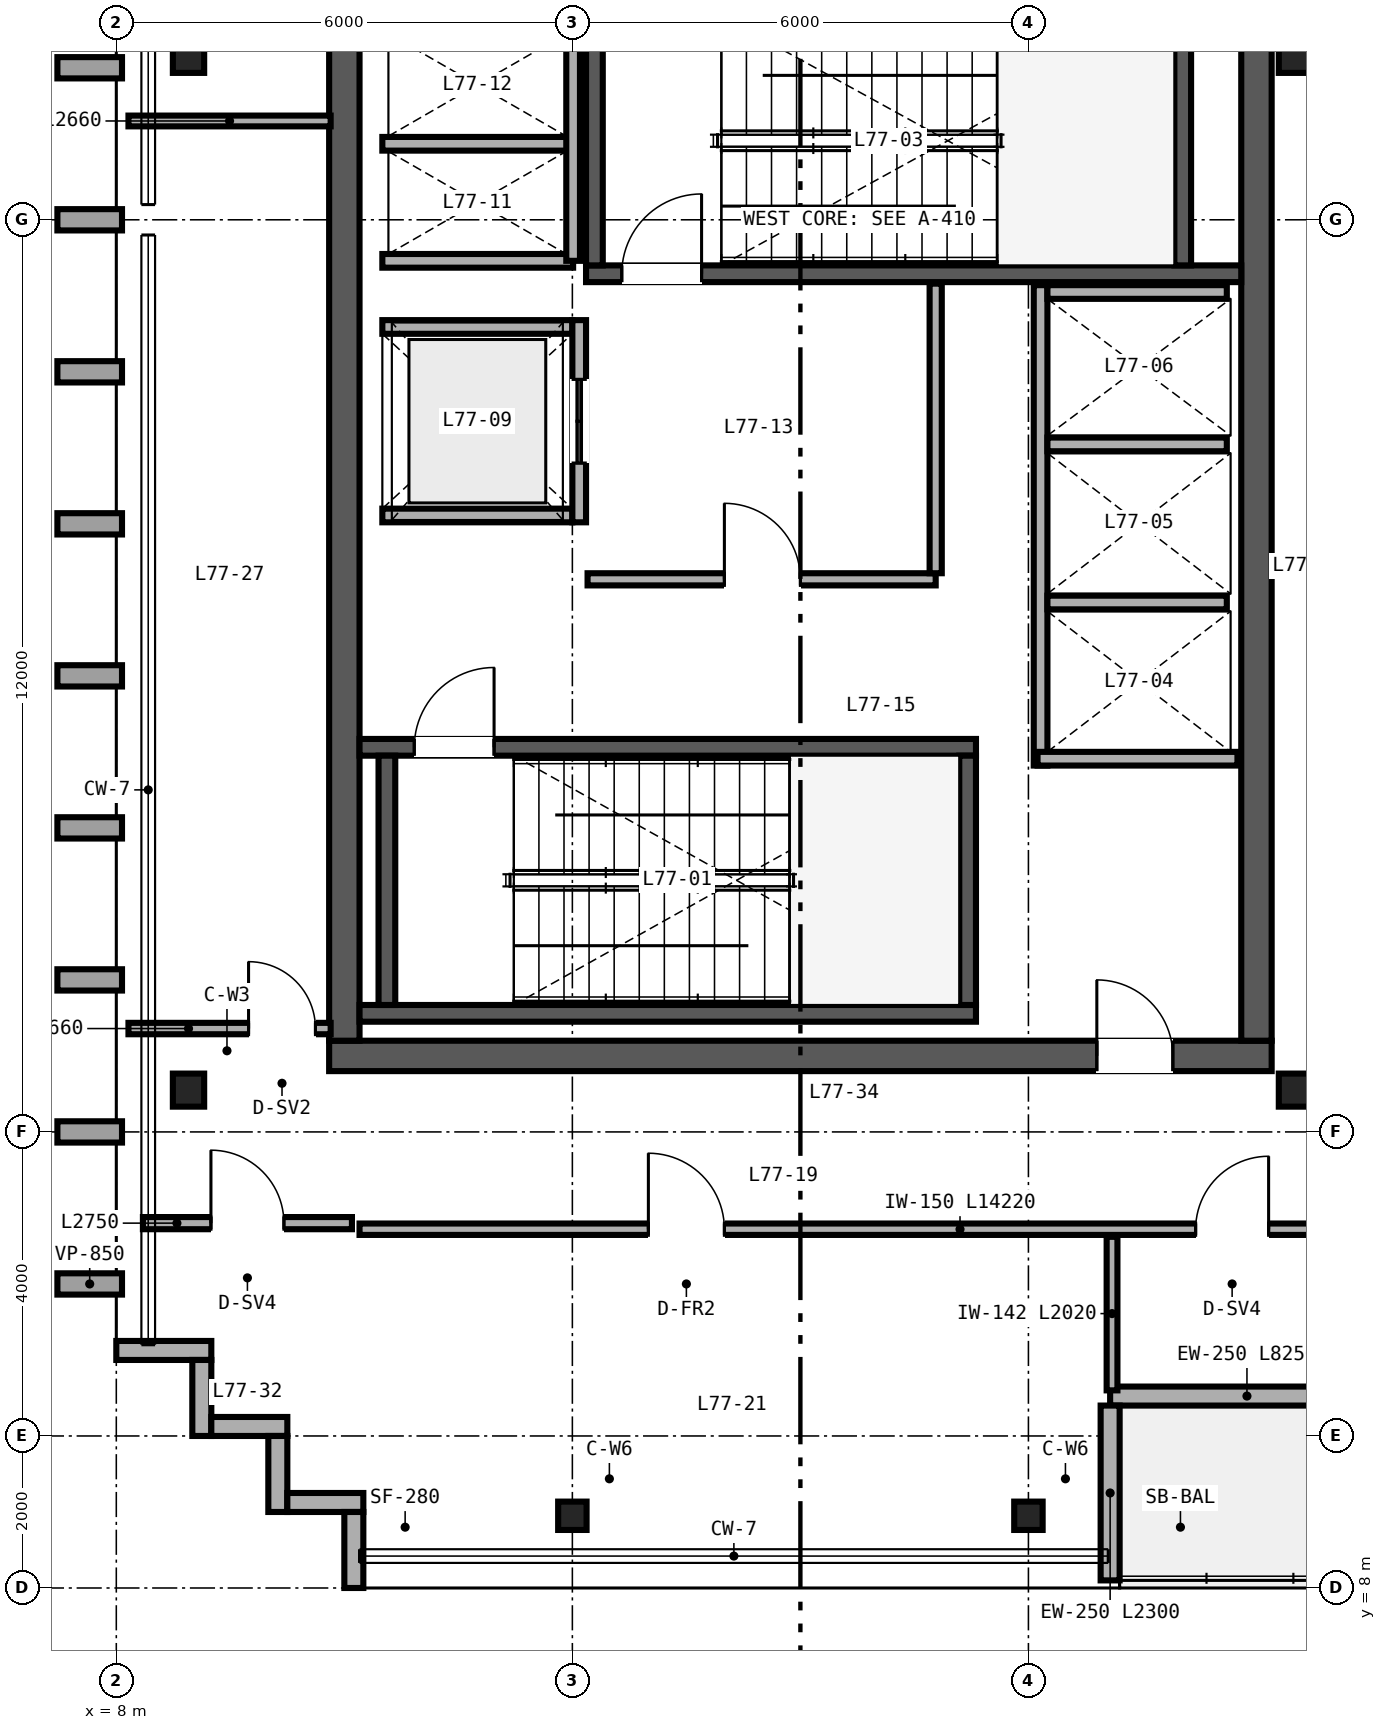
"""IFC4 building model, lengths in metres.
Left out: names, types, materials, properties, quantities, classifications, styles, units other than length and angle.
Written with IfcOpenShell. Run it as: python <this file> out.ifc"""

import sys

from ifc_helpers import new_model, si_unit, direction, frame, frame_2d, origin, origin_2d, place, context, subcontext, project, spatial, rectangle, i_section, extrude, source, transform, mapped, element, fill, save


model = new_model("IFC4")
c1 = context("Model", 3, precision=1e-05, world=origin(), true_north=direction((0.0, 1.0)))
c2 = subcontext(c1, "Body", "Model", "MODEL_VIEW")
j1 = project(units=[si_unit("LENGTHUNIT", "METRE"), si_unit("PLANEANGLEUNIT", "RADIAN")], contexts=[c1])
p1 = place(None, origin())
s1 = spatial("IfcSite", under=j1, at=p1, CompositionType="ELEMENT")
p2 = place(p1, origin())
s2 = spatial("IfcBuilding", under=s1, at=p2, CompositionType="ELEMENT")
p3 = place(p2, frame((0.0, 0.0, 301.2)))
s3 = spatial("IfcBuildingStorey", under=s2, at=p3, CompositionType="ELEMENT", Elevation=301.2)
p4 = place(p3, frame((10.8, 15.0, 0.0), z_axis=(0.0, 0.0, 1.0), x_axis=(1.0, 0.0, 0.0)))
e1 = element("IfcWall", 1, at=p4, inside=s3, PredefinedType="SHEAR", context=c2, shape_type="SweptSolid", body=[
    extrude(rectangle(XDim=12.4, YDim=0.4, at=frame_2d((6.2, 0.0))), origin(), (0.0, 0.0, 1.0), 3.92),
])
p5 = place(p4, frame((10.1, 0.0, 0.0)))
e2 = element("IfcOpeningElement", 2, at=p5, cuts=e1, PredefinedType="OPENING", context=c2, shape_type="SweptSolid", body=[
    extrude(rectangle(XDim=1.0, YDim=2.15, at=frame_2d((0.5, 1.075))), frame((0.0, 0.21, 0.0), z_axis=(0.0, -1.0, 0.0), x_axis=(1.0, 0.0, 0.0)), (0.0, 0.0, 1.0), 0.42),
])
for number, where, z_axis, x_axis in (
    (3, (11.0, 15.2, 0.0), (0.0, 0.0, 1.0), (0.0, 1.0, 0.0)),
    (4, (23.0, 15.2, 0.0), (0.0, 0.0, 1.0), (0.0, 1.0, 0.0)),
):
    element("IfcWall", number, at=place(p3, frame(where, z_axis=z_axis, x_axis=x_axis)), inside=s3, PredefinedType="SHEAR", context=c2, shape_type="SweptSolid", body=[
        extrude(rectangle(XDim=21.6, YDim=0.4, at=frame_2d((10.8, 0.0))), origin(), (0.0, 0.0, 1.0), 3.92),
    ])
p6 = place(p3, frame((11.2, 15.56, 0.0), z_axis=(0.0, 0.0, 1.0), x_axis=(1.0, 0.0, 0.0)))
e5 = element("IfcWall", 5, at=p6, inside=s3, PredefinedType="SHEAR", context=c2, shape_type="SweptSolid", body=[
    extrude(rectangle(XDim=8.11, YDim=0.22, at=frame_2d((4.055, 0.0))), origin(), (0.0, 0.0, 1.0), 4.0),
])
p7 = place(p3, frame((11.2, 19.06, 0.0), z_axis=(0.0, 0.0, 1.0), x_axis=(1.0, 0.0, 0.0)))
e6 = element("IfcWall", 6, at=p7, inside=s3, PredefinedType="SHEAR", context=c2, shape_type="SweptSolid", body=[
    extrude(rectangle(XDim=8.11, YDim=0.22, at=frame_2d((4.055, 0.0))), origin(), (0.0, 0.0, 1.0), 4.0),
])
p8 = place(p7, frame((0.72, 0.0, 0.0)))
e7 = element("IfcOpeningElement", 7, at=p8, cuts=e6, PredefinedType="OPENING", context=c2, shape_type="SweptSolid", body=[
    extrude(rectangle(XDim=1.05, YDim=2.15, at=frame_2d((0.525, 1.075))), frame((0.0, 0.12, 0.0), z_axis=(0.0, -1.0, 0.0), x_axis=(1.0, 0.0, 0.0)), (0.0, 0.0, 1.0), 0.24),
])
for number, where, z_axis, x_axis in (
    (8, (11.56, 15.67, 0.0), (0.0, 0.0, 1.0), (0.0, 1.0, 0.0)),
    (9, (19.2, 15.67, 0.0), (0.0, 0.0, 1.0), (0.0, 1.0, 0.0)),
):
    element("IfcWall", number, at=place(p3, frame(where, z_axis=z_axis, x_axis=x_axis)), inside=s3, PredefinedType="SHEAR", context=c2, shape_type="SweptSolid", body=[
        extrude(rectangle(XDim=3.28, YDim=0.22, at=frame_2d((1.64, 0.0))), origin(), (0.0, 0.0, 1.0), 4.0),
    ])
p9 = place(p3, frame((14.18, 25.29, 0.0), z_axis=(0.0, 0.0, 1.0), x_axis=(1.0, 0.0, 0.0)))
e10 = element("IfcWall", 10, at=p9, inside=s3, PredefinedType="SHEAR", context=c2, shape_type="SweptSolid", body=[
    extrude(rectangle(XDim=8.62, YDim=0.22, at=frame_2d((4.31, 0.0))), origin(), (0.0, 0.0, 1.0), 4.0),
])
p10 = place(p9, frame((0.47, 0.0, 0.0)))
e11 = element("IfcOpeningElement", 11, at=p10, cuts=e10, PredefinedType="OPENING", context=c2, shape_type="SweptSolid", body=[
    extrude(rectangle(XDim=1.05, YDim=2.15, at=frame_2d((0.525, 1.075))), frame((0.0, 0.12, 0.0), z_axis=(0.0, -1.0, 0.0), x_axis=(1.0, 0.0, 0.0)), (0.0, 0.0, 1.0), 0.24),
])
for number, where, z_axis, x_axis in (
    (12, (14.29, 25.4, 0.0), (0.0, 0.0, 1.0), (0.0, 1.0, 0.0)),
    (13, (22.03, 25.4, 0.0), (0.0, 0.0, 1.0), (0.0, 1.0, 0.0)),
):
    element("IfcWall", number, at=place(p3, frame(where, z_axis=z_axis, x_axis=x_axis)), inside=s3, PredefinedType="SHEAR", context=c2, shape_type="SweptSolid", body=[
        extrude(rectangle(XDim=3.28, YDim=0.22, at=frame_2d((1.64, 0.0))), origin(), (0.0, 0.0, 1.0), 4.0),
    ])
m1 = source(origin(), c2, "Body", "SweptSolid", [
    extrude(i_section(OverallWidth=0.412, OverallDepth=0.435, WebThickness=0.036, FlangeThickness=0.057, FilletRadius=0.025, at=origin_2d()), origin(), (0.0, 0.0, 1.0), 3.92),
])
for number, where, z_axis, x_axis in (
    (14, (8.95, 14.55, 0.0), (0.0, 0.0, 1.0), (1.0, 0.0, 0.0)),
    (15, (23.5, 14.55, 0.0), (0.0, 0.0, 1.0), (1.0, 0.0, 0.0)),
    (16, (8.95, 28.15, 0.0), (0.0, 0.0, 1.0), (1.0, 0.0, 0.0)),
    (17, (23.5, 28.15, 0.0), (0.0, 0.0, 1.0), (1.0, 0.0, 0.0)),
):
    element("IfcColumn", number, at=place(p3, frame(where, z_axis=z_axis, x_axis=x_axis)), inside=s3, PredefinedType="COLUMN", context=c2, shape_type="MappedRepresentation", body=[
        mapped(m1, transform((0.0, 0.0, 0.0), scale=1.0)),
    ])
m2 = source(origin(), c2, "Body", "SweptSolid", [
    extrude(i_section(OverallWidth=0.374, OverallDepth=0.373, WebThickness=0.016, FlangeThickness=0.026, FilletRadius=0.025, at=origin_2d()), origin(), (0.0, 0.0, 1.0), 3.92),
])
for number, where, z_axis, x_axis in (
    (18, (14.0, 8.95, 0.0), (0.0, 0.0, 1.0), (1.0, 0.0, 0.0)),
    (19, (20.0, 8.95, 0.0), (0.0, 0.0, 1.0), (1.0, 0.0, 0.0)),
):
    element("IfcColumn", number, at=place(p3, frame(where, z_axis=z_axis, x_axis=x_axis)), inside=s3, PredefinedType="COLUMN", context=c2, shape_type="MappedRepresentation", body=[
        mapped(m2, transform((0.0, 0.0, 0.0), scale=1.0)),
    ])
p11 = place(p3, frame((8.0, 11.125, 0.0), z_axis=(0.0, 0.0, 1.0), x_axis=(1.0, 0.0, 0.0)))
e20 = element("IfcWall", 20, at=p11, inside=s3, PredefinedType="SOLIDWALL", context=c2, shape_type="SweptSolid", body=[
    extrude(rectangle(XDim=1.25, YDim=0.25, at=frame_2d((0.625, 0.0))), origin(), (0.0, 0.0, 1.0), 3.92),
])
for number, where, z_axis, x_axis in (
    (21, (9.125, 11.0, 0.0), (0.0, 0.0, 1.0), (0.0, -1.0, 0.0)),
    (22, (9.25, 10.125, 0.0), (0.0, 0.0, 1.0), (1.0, 0.0, 0.0)),
    (23, (10.125, 10.0, 0.0), (0.0, 0.0, 1.0), (0.0, -1.0, 0.0)),
    (24, (10.25, 9.125, 0.0), (0.0, 0.0, 1.0), (1.0, 0.0, 0.0)),
    (25, (11.125, 9.0, 0.0), (0.0, 0.0, 1.0), (0.0, -1.0, 0.0)),
):
    element("IfcWall", number, at=place(p3, frame(where, z_axis=z_axis, x_axis=x_axis)), inside=s3, PredefinedType="SOLIDWALL", context=c2, shape_type="SweptSolid", body=[
        extrude(rectangle(XDim=1.0, YDim=0.25, at=frame_2d((0.5, 0.0))), origin(), (0.0, 0.0, 1.0), 3.92),
    ])
p12 = place(p3, frame((21.075, 10.525, 0.0), z_axis=(0.0, 0.0, 1.0), x_axis=(1.0, 0.0, 0.0)))
e26 = element("IfcWall", 26, at=p12, inside=s3, PredefinedType="SOLIDWALL", context=c2, shape_type="SweptSolid", body=[
    extrude(rectangle(XDim=8.25, YDim=0.25, at=frame_2d((4.125, 0.0))), origin(), (0.0, 0.0, 1.0), 3.92),
])
p13 = place(p12, frame((3.6, 0.0, 0.0)))
e27 = element("IfcOpeningElement", 27, at=p13, cuts=e26, PredefinedType="OPENING", context=c2, shape_type="SweptSolid", body=[
    extrude(rectangle(XDim=1.05, YDim=2.15, at=frame_2d((0.525, 1.075))), frame((0.0, 0.135, 0.0), z_axis=(0.0, -1.0, 0.0), x_axis=(1.0, 0.0, 0.0)), (0.0, 0.0, 1.0), 0.27),
])
p14 = place(p3, frame((21.075, 8.1, 0.0), z_axis=(0.0, 0.0, 1.0), x_axis=(0.0, 1.0, 0.0)))
e28 = element("IfcWall", 28, at=p14, inside=s3, PredefinedType="SOLIDWALL", context=c2, shape_type="SweptSolid", body=[
    extrude(rectangle(XDim=2.3, YDim=0.25, at=frame_2d((1.15, 0.0))), origin(), (0.0, 0.0, 1.0), 3.92),
])
p15 = place(p3, frame((20.16, 18.82, 0.0), z_axis=(0.0, 0.0, 1.0), x_axis=(0.0, 1.0, 0.0)))
e29 = element("IfcWall", 29, at=p15, inside=s3, PredefinedType="SOLIDWALL", context=c2, shape_type="SweptSolid", body=[
    extrude(rectangle(XDim=6.32, YDim=0.18, at=frame_2d((3.16, 0.0))), origin(), (0.0, 0.0, 1.0), 3.02),
])
p16 = place(p3, frame((20.12, 18.91, 0.0), z_axis=(0.0, 0.0, 1.0), x_axis=(1.0, 0.0, 0.0)))
e30 = element("IfcWall", 30, at=p16, inside=s3, PredefinedType="SOLIDWALL", context=c2, shape_type="SweptSolid", body=[
    extrude(rectangle(XDim=2.63, YDim=0.18, at=frame_2d((1.315, 0.0))), origin(), (0.0, 0.0, 1.0), 3.92),
])
p17 = place(p3, frame((20.25, 25.05, 0.0), z_axis=(0.0, 0.0, 1.0), x_axis=(1.0, 0.0, 0.0)))
e31 = element("IfcWall", 31, at=p17, inside=s3, PredefinedType="SOLIDWALL", context=c2, shape_type="SweptSolid", body=[
    extrude(rectangle(XDim=2.36, YDim=0.18, at=frame_2d((1.18, 0.0))), origin(), (0.0, 0.0, 1.0), 3.92),
])
p18 = place(p3, frame((20.25, 20.965, 0.0), z_axis=(0.0, 0.0, 1.0), x_axis=(1.0, 0.0, 0.0)))
e32 = element("IfcWall", 32, at=p18, inside=s3, PredefinedType="SOLIDWALL", context=c2, shape_type="SweptSolid", body=[
    extrude(rectangle(XDim=2.36, YDim=0.18, at=frame_2d((1.18, 0.0))), origin(), (0.0, 0.0, 1.0), 3.02),
])
p19 = place(p3, frame((20.25, 23.045, 0.0), z_axis=(0.0, 0.0, 1.0), x_axis=(1.0, 0.0, 0.0)))
e33 = element("IfcWall", 33, at=p19, inside=s3, PredefinedType="SOLIDWALL", context=c2, shape_type="SweptSolid", body=[
    extrude(rectangle(XDim=2.36, YDim=0.18, at=frame_2d((1.18, 0.0))), origin(), (0.0, 0.0, 1.0), 3.92),
])
for number, where, z_axis, x_axis in (
    (34, (11.5, 22.11, 0.0), (0.0, 0.0, 1.0), (1.0, 0.0, 0.0)),
    (35, (11.5, 24.59, 0.0), (0.0, 0.0, 1.0), (1.0, 0.0, 0.0)),
):
    element("IfcWall", number, at=place(p3, frame(where, z_axis=z_axis, x_axis=x_axis)), inside=s3, PredefinedType="SOLIDWALL", context=c2, shape_type="SweptSolid", body=[
        extrude(rectangle(XDim=2.5, YDim=0.18, at=frame_2d((1.25, 0.0))), origin(), (0.0, 0.0, 1.0), 3.92),
    ])
p20 = place(p3, frame((14.09, 22.02, 0.0), z_axis=(0.0, 0.0, 1.0), x_axis=(0.0, 1.0, 0.0)))
e36 = element("IfcWall", 36, at=p20, inside=s3, PredefinedType="SOLIDWALL", context=c2, shape_type="SweptSolid", body=[
    extrude(rectangle(XDim=2.66, YDim=0.18, at=frame_2d((1.33, 0.0))), origin(), (0.0, 0.0, 1.0), 3.92),
])
p21 = place(p20, frame((0.78, 0.0, 0.0)))
e37 = element("IfcOpeningElement", 37, at=p21, cuts=e36, PredefinedType="OPENING", context=c2, shape_type="SweptSolid", body=[
    extrude(rectangle(XDim=1.1, YDim=2.2, at=frame_2d((0.55, 1.1))), frame((0.0, 0.1, 0.0), z_axis=(0.0, -1.0, 0.0), x_axis=(1.0, 0.0, 0.0)), (0.0, 0.0, 1.0), 0.2),
])
for number, where, z_axis, x_axis in (
    (38, (11.5, 25.46, 0.0), (0.0, 0.0, 1.0), (1.0, 0.0, 0.0)),
    (39, (11.5, 27.0, 0.0), (0.0, 0.0, 1.0), (1.0, 0.0, 0.0)),
):
    element("IfcWall", number, at=place(p3, frame(where, z_axis=z_axis, x_axis=x_axis)), inside=s3, PredefinedType="SOLIDWALL", context=c2, shape_type="SweptSolid", body=[
        extrude(rectangle(XDim=2.51, YDim=0.18, at=frame_2d((1.255, 0.0))), origin(), (0.0, 0.0, 1.0), 3.92),
    ])
p22 = place(p3, frame((14.01, 25.46, 0.0), z_axis=(0.0, 0.0, 1.0), x_axis=(0.0, 1.0, 0.0)))
e40 = element("IfcWall", 40, at=p22, inside=s3, PredefinedType="SOLIDWALL", context=c2, shape_type="SweptSolid", body=[
    extrude(rectangle(XDim=3.08, YDim=0.18, at=frame_2d((1.54, 0.0))), origin(), (0.0, 0.0, 1.0), 3.92),
])
p23 = place(p3, frame((14.2, 21.27, 0.0), z_axis=(0.0, 0.0, 1.0), x_axis=(1.0, 0.0, 0.0)))
e41 = element("IfcWall", 41, at=p23, inside=s3, PredefinedType="PARTITIONING", context=c2, shape_type="SweptSolid", body=[
    extrude(rectangle(XDim=4.58, YDim=0.16, at=frame_2d((2.29, 0.0))), origin(), (0.0, 0.0, 1.0), 3.92),
])
p24 = place(p23, frame((1.8, 0.0, 0.0)))
e42 = element("IfcOpeningElement", 42, at=p24, cuts=e41, PredefinedType="OPENING", context=c2, shape_type="SweptSolid", body=[
    extrude(rectangle(XDim=1.0, YDim=2.15, at=frame_2d((0.5, 1.075))), frame((0.0, 0.09, 0.0), z_axis=(0.0, -1.0, 0.0), x_axis=(1.0, 0.0, 0.0)), (0.0, 0.0, 1.0), 0.18),
])
p25 = place(p3, frame((18.78, 21.35, 0.0), z_axis=(0.0, 0.0, 1.0), x_axis=(0.0, 1.0, 0.0)))
e43 = element("IfcWall", 43, at=p25, inside=s3, PredefinedType="PARTITIONING", context=c2, shape_type="SweptSolid", body=[
    extrude(rectangle(XDim=3.81, YDim=0.16, at=frame_2d((1.905, 0.0))), origin(), (0.0, 0.0, 1.0), 3.92),
])
p26 = place(p3, frame((11.2, 12.72, 0.0), z_axis=(0.0, 0.0, 1.0), x_axis=(1.0, 0.0, 0.0)))
e44 = element("IfcWall", 44, at=p26, inside=s3, PredefinedType="PARTITIONING", context=c2, shape_type="SweptSolid", body=[
    extrude(rectangle(XDim=14.22, YDim=0.15, at=frame_2d((7.11, 0.0))), origin(), (0.0, 0.0, 1.0), 3.92),
])
p27 = place(p26, frame((3.8, 0.0, 0.0)))
e45 = element("IfcOpeningElement", 45, at=p27, cuts=e44, PredefinedType="OPENING", context=c2, shape_type="SweptSolid", body=[
    extrude(rectangle(XDim=1.0, YDim=2.15, at=frame_2d((0.5, 1.075))), frame((0.0, 0.085, 0.0), z_axis=(0.0, -1.0, 0.0), x_axis=(1.0, 0.0, 0.0)), (0.0, 0.0, 1.0), 0.17),
])
p28 = place(p26, frame((11.0, 0.0, 0.0)))
e46 = element("IfcOpeningElement", 46, at=p28, cuts=e44, PredefinedType="OPENING", context=c2, shape_type="SweptSolid", body=[
    extrude(rectangle(XDim=0.96, YDim=2.15, at=frame_2d((0.48, 1.075))), frame((0.0, 0.085, 0.0), z_axis=(0.0, -1.0, 0.0), x_axis=(1.0, 0.0, 0.0)), (0.0, 0.0, 1.0), 0.17),
])
p29 = place(p3, frame((21.1, 10.6, 0.0), z_axis=(0.0, 0.0, 1.0), x_axis=(0.0, 1.0, 0.0)))
e47 = element("IfcWall", 47, at=p29, inside=s3, PredefinedType="PARTITIONING", context=c2, shape_type="SweptSolid", body=[
    extrude(rectangle(XDim=2.02, YDim=0.142, at=frame_2d((1.01, 0.0))), origin(), (0.0, 0.0, 1.0), 3.92),
])
p30 = place(p3, frame((8.16, 15.36, 0.0), z_axis=(0.0, 0.0, 1.0), x_axis=(1.0, 0.0, 0.0)))
e48 = element("IfcWall", 48, at=p30, inside=s3, PredefinedType="PARTITIONING", context=c2, shape_type="SweptSolid", body=[
    extrude(rectangle(XDim=2.66, YDim=0.15, at=frame_2d((1.33, 0.0))), origin(), (0.0, 0.0, 1.0), 3.141),
])
p31 = place(p30, frame((1.58, 0.0, 0.0)))
e49 = element("IfcOpeningElement", 49, at=p31, cuts=e48, PredefinedType="OPENING", context=c2, shape_type="SweptSolid", body=[
    extrude(rectangle(XDim=0.88, YDim=2.15, at=frame_2d((0.44, 1.075))), frame((0.0, 0.085, 0.0), z_axis=(0.0, -1.0, 0.0), x_axis=(1.0, 0.0, 0.0)), (0.0, 0.0, 1.0), 0.17),
])
p32 = place(p3, frame((8.16, 27.3, 0.0), z_axis=(0.0, 0.0, 1.0), x_axis=(1.0, 0.0, 0.0)))
e50 = element("IfcWall", 50, at=p32, inside=s3, PredefinedType="PARTITIONING", context=c2, shape_type="SweptSolid", body=[
    extrude(rectangle(XDim=2.66, YDim=0.142, at=frame_2d((1.33, 0.0))), origin(), (0.0, 0.0, 1.0), 3.141),
])
p33 = place(p3, frame((8.35, 12.8, 0.0), z_axis=(0.0, 0.0, 1.0), x_axis=(1.0, 0.0, 0.0)))
e51 = element("IfcWall", 51, at=p33, inside=s3, PredefinedType="PARTITIONING", context=c2, shape_type="SweptSolid", body=[
    extrude(rectangle(XDim=2.75, YDim=0.16, at=frame_2d((1.375, 0.0))), origin(), (0.0, 0.0, 1.0), 3.92),
])
p34 = place(p33, frame((0.895, 0.0, 0.0)))
e52 = element("IfcOpeningElement", 52, at=p34, cuts=e51, PredefinedType="OPENING", context=c2, shape_type="SweptSolid", body=[
    extrude(rectangle(XDim=0.96, YDim=2.15, at=frame_2d((0.48, 1.075))), frame((0.0, 0.09, 0.0), z_axis=(0.0, -1.0, 0.0), x_axis=(1.0, 0.0, 0.0)), (0.0, 0.0, 1.0), 0.18),
])
m3 = source(origin(), c2, "Body", "SweptSolid", [
    extrude(rectangle(XDim=1.05, YDim=2.15, at=frame_2d((0.525, 1.075))), frame((0.0, 0.025, 0.0), z_axis=(0.0, -1.0, 0.0), x_axis=(1.0, 0.0, 0.0)), (0.0, 0.0, 1.0), 0.05),
])
p35 = place(p8, origin())
e53 = element("IfcDoor", 53, at=p35, inside=s3, OperationType="SINGLE_SWING_RIGHT", PredefinedType="DOOR", context=c2, shape_type="MappedRepresentation", body=[
    mapped(m3, transform((0.0, 0.0, 0.0), scale=1.0)),
])
fill(e7, e53)
p36 = place(p10, origin())
e54 = element("IfcDoor", 54, at=p36, inside=s3, OperationType="SINGLE_SWING_RIGHT", PredefinedType="DOOR", context=c2, shape_type="MappedRepresentation", body=[
    mapped(m3, transform((0.0, 0.0, 0.0), scale=1.0)),
])
fill(e11, e54)
m4 = source(origin(), c2, "Body", "SweptSolid", [
    extrude(rectangle(XDim=1.1, YDim=2.2, at=frame_2d((0.55, 1.1))), frame((0.0, 0.025, 0.0), z_axis=(0.0, -1.0, 0.0), x_axis=(1.0, 0.0, 0.0)), (0.0, 0.0, 1.0), 0.05),
])
p37 = place(p21, origin())
e55 = element("IfcDoor", 55, at=p37, inside=s3, OperationType="DOUBLE_DOOR_SLIDING", PredefinedType="DOOR", context=c2, shape_type="MappedRepresentation", body=[
    mapped(m4, transform((0.0, 0.0, 0.0), scale=1.0)),
])
fill(e37, e55)
m5 = source(origin(), c2, "Body", "SweptSolid", [
    extrude(rectangle(XDim=1.0, YDim=2.15, at=frame_2d((0.5, 1.075))), frame((0.0, 0.025, 0.0), z_axis=(0.0, -1.0, 0.0), x_axis=(1.0, 0.0, 0.0)), (0.0, 0.0, 1.0), 0.05),
])
p38 = place(p24, origin())
e56 = element("IfcDoor", 56, at=p38, inside=s3, OperationType="SINGLE_SWING_LEFT", PredefinedType="DOOR", context=c2, shape_type="MappedRepresentation", body=[
    mapped(m5, transform((0.0, 0.0, 0.0), scale=1.0)),
])
fill(e42, e56)
p39 = place(p5, origin())
e57 = element("IfcDoor", 57, at=p39, inside=s3, OperationType="SINGLE_SWING_LEFT", PredefinedType="DOOR", context=c2, shape_type="MappedRepresentation", body=[
    mapped(m5, transform((0.0, 0.0, 0.0), scale=1.0)),
])
fill(e2, e57)
p40 = place(p27, origin())
e58 = element("IfcDoor", 58, at=p40, inside=s3, OperationType="SINGLE_SWING_LEFT", PredefinedType="DOOR", context=c2, shape_type="MappedRepresentation", body=[
    mapped(m5, transform((0.0, 0.0, 0.0), scale=1.0)),
])
fill(e45, e58)
m6 = source(origin(), c2, "Body", "SweptSolid", [
    extrude(rectangle(XDim=0.96, YDim=2.15, at=frame_2d((0.48, 1.075))), frame((0.0, 0.025, 0.0), z_axis=(0.0, -1.0, 0.0), x_axis=(1.0, 0.0, 0.0)), (0.0, 0.0, 1.0), 0.05),
])
p41 = place(p28, origin())
e59 = element("IfcDoor", 59, at=p41, inside=s3, OperationType="SINGLE_SWING_RIGHT", PredefinedType="DOOR", context=c2, shape_type="MappedRepresentation", body=[
    mapped(m6, transform((0.0, 0.0, 0.0), scale=1.0)),
])
fill(e46, e59)
m7 = source(origin(), c2, "Body", "SweptSolid", [
    extrude(rectangle(XDim=0.88, YDim=2.15, at=frame_2d((0.44, 1.075))), frame((0.0, 0.025, 0.0), z_axis=(0.0, -1.0, 0.0), x_axis=(1.0, 0.0, 0.0)), (0.0, 0.0, 1.0), 0.05),
])
p42 = place(p31, origin())
e60 = element("IfcDoor", 60, at=p42, inside=s3, OperationType="SINGLE_SWING_LEFT", PredefinedType="DOOR", context=c2, shape_type="MappedRepresentation", body=[
    mapped(m7, transform((0.0, 0.0, 0.0), scale=1.0)),
])
fill(e49, e60)
p43 = place(p34, origin())
e61 = element("IfcDoor", 61, at=p43, inside=s3, OperationType="SINGLE_SWING_LEFT", PredefinedType="DOOR", context=c2, shape_type="MappedRepresentation", body=[
    mapped(m6, transform((0.0, 0.0, 0.0), scale=1.0)),
])
fill(e52, e61)
save(model, sys.argv[1])
